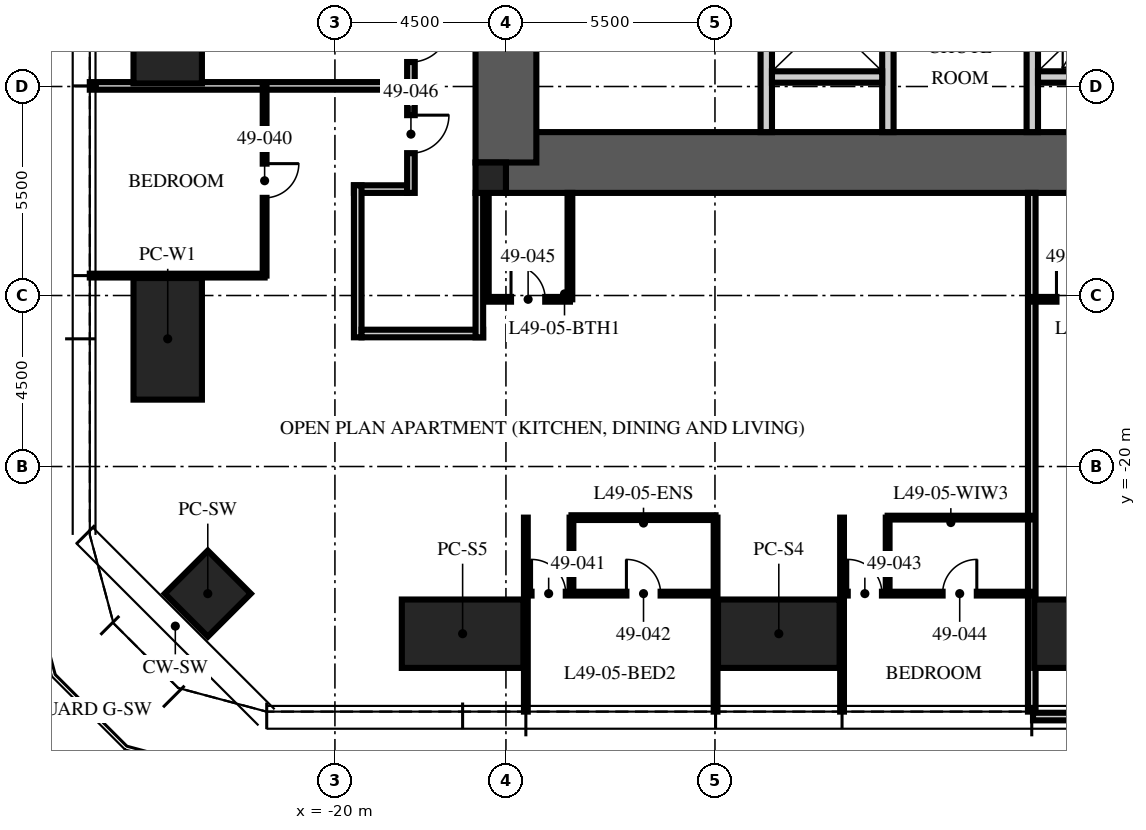
"""IFC4 building model, lengths in metres.
Left out: names, types, materials, properties, quantities, classifications, styles, units other than length and angle.
Written with IfcOpenShell. Run it as: python <this file> out.ifc"""

import sys

from ifc_helpers import new_model, si_unit, direction, frame, frame_2d, origin, origin_2d, place, context, subcontext, project, spatial, rectangle, hollow_rectangle, extrude, element, fill, save


model = new_model("IFC4")
c1 = context("Model", 3, precision=1e-05, world=origin(), true_north=direction((0.0, 1.0)))
c2 = subcontext(c1, "Body", "Model", "MODEL_VIEW")
j1 = project(units=[si_unit("LENGTHUNIT", "METRE"), si_unit("PLANEANGLEUNIT", "RADIAN")], contexts=[c1])
p1 = place(None, origin())
s1 = spatial("IfcSite", under=j1, at=p1, CompositionType="ELEMENT")
p2 = place(p1, origin())
s2 = spatial("IfcBuilding", under=s1, at=p2, CompositionType="ELEMENT")
p3 = place(p2, frame((0.0, 0.0, 199.5)))
s3 = spatial("IfcBuildingStorey", under=s2, at=p3, CompositionType="ELEMENT", Elevation=199.5)
p4 = place(p3, frame((-15.5, -12.0, -0.25), z_axis=(0.0, 0.0, 1.0), x_axis=(1.0, 0.0, 0.0)))
e1 = element("IfcWall", 1, at=p4, inside=s3, PredefinedType="SHEAR", context=c2, shape_type="SweptSolid", body=[
    extrude(rectangle(XDim=31.0, YDim=1.6, at=frame_2d((15.5, 0.0))), origin(), (0.0, 0.0, 1.0), 3.75),
])
p5 = place(p3, frame((-15.5, -12.0, -0.25), z_axis=(0.0, 0.0, 1.0), x_axis=(0.0, 1.0, 0.0)))
e2 = element("IfcWall", 2, at=p5, inside=s3, PredefinedType="SHEAR", context=c2, shape_type="SweptSolid", body=[
    extrude(rectangle(XDim=24.0, YDim=1.6, at=frame_2d((12.0, 0.0))), origin(), (0.0, 0.0, 1.0), 3.75),
])
p6 = place(p5, frame((3.2, 0.0, 0.25)))
e3 = element("IfcOpeningElement", 3, at=p6, cuts=e2, PredefinedType="OPENING", context=c2, shape_type="SweptSolid", body=[
    extrude(rectangle(XDim=1.2, YDim=2.1, at=frame_2d((0.6, 1.05))), frame((0.0, 0.81, 0.0), z_axis=(0.0, -1.0, 0.0), x_axis=(1.0, 0.0, 0.0)), (0.0, 0.0, 1.0), 1.62),
])
p7 = place(p5, frame((19.3, 0.0, 0.25)))
e4 = element("IfcOpeningElement", 4, at=p7, cuts=e2, PredefinedType="OPENING", context=c2, shape_type="SweptSolid", body=[
    extrude(rectangle(XDim=1.8, YDim=2.1, at=frame_2d((0.9, 1.05))), frame((0.0, 0.81, 0.0), z_axis=(0.0, -1.0, 0.0), x_axis=(1.0, 0.0, 0.0)), (0.0, 0.0, 1.0), 1.62),
])
p8 = place(p3, frame((-15.9, -12.4, -0.25), z_axis=(0.0, 0.0, 1.0), x_axis=(1.0, 0.0, 0.0)))
e5 = element("IfcColumn", 5, at=p8, inside=s3, PredefinedType="COLUMN", context=c2, shape_type="SweptSolid", body=[
    extrude(rectangle(XDim=0.8, YDim=0.8, at=origin_2d()), origin(), (0.0, 0.0, 1.0), 3.75),
])
p9 = place(p3, frame((0.0, -24.4, -0.23), z_axis=(0.0, 0.0, 1.0), x_axis=(1.0, 0.0, 0.0)))
e6 = element("IfcColumn", 6, at=p9, inside=s3, PredefinedType="COLUMN", context=c2, shape_type="SweptSolid", body=[
    extrude(hollow_rectangle(XDim=3.2, YDim=1.8, WallThickness=0.2, at=origin_2d()), origin(), (0.0, 0.0, 1.0), 3.98),
])
p10 = place(p3, frame((-8.32, -24.4, -0.07), z_axis=(0.0, 0.0, 1.0), x_axis=(1.0, 0.0, 0.0)))
e7 = element("IfcColumn", 7, at=p10, inside=s3, PredefinedType="COLUMN", context=c2, shape_type="SweptSolid", body=[
    extrude(hollow_rectangle(XDim=3.2, YDim=1.8, WallThickness=0.2, at=origin_2d()), origin(), (0.0, 0.0, 1.0), 3.82),
])
for number, where, z_axis, x_axis in (
    (8, (-16.64, -24.4, 0.08), (0.0, 0.0, 1.0), (1.0, 0.0, 0.0)),
    (9, (-24.4, -16.64, 0.08), (0.0, 0.0, 1.0), (0.0, 1.0, 0.0)),
):
    element("IfcColumn", number, at=place(p3, frame(where, z_axis=z_axis, x_axis=x_axis)), inside=s3, PredefinedType="COLUMN", context=c2, shape_type="SweptSolid", body=[
        extrude(hollow_rectangle(XDim=3.2, YDim=1.8, WallThickness=0.2, at=origin_2d()), origin(), (0.0, 0.0, 1.0), 3.67),
    ])
p11 = place(p3, frame((-24.4, -8.32, -0.07), z_axis=(0.0, 0.0, 1.0), x_axis=(0.0, 1.0, 0.0)))
e10 = element("IfcColumn", 10, at=p11, inside=s3, PredefinedType="COLUMN", context=c2, shape_type="SweptSolid", body=[
    extrude(hollow_rectangle(XDim=3.2, YDim=1.8, WallThickness=0.2, at=origin_2d()), origin(), (0.0, 0.0, 1.0), 3.82),
])
p12 = place(p3, frame((-23.346, -23.346, -0.19), z_axis=(0.0, 0.0, 1.0), x_axis=(0.707106781187, -0.707106781187, 0.0)))
e11 = element("IfcColumn", 11, at=p12, inside=s3, PredefinedType="COLUMN", context=c2, shape_type="SweptSolid", body=[
    extrude(hollow_rectangle(XDim=1.6, YDim=1.6, WallThickness=0.1, at=origin_2d()), origin(), (0.0, 0.0, 1.0), 3.94),
])
p13 = place(p3, frame((-1.632, -26.58, 0.0), z_axis=(0.0, 0.0, 1.0), x_axis=(1.0, 0.0, 0.0)))
e12 = element("IfcWall", 12, at=p13, inside=s3, PredefinedType="ELEMENTEDWALL", context=c2, shape_type="SweptSolid", body=[
    extrude(rectangle(XDim=3.263, YDim=0.2, at=frame_2d((1.632, 0.0))), origin(), (0.0, 0.0, 1.0), 3.75),
])
p14 = place(p13, frame((1.132, 0.0, 0.0)))
e13 = element("IfcOpeningElement", 13, at=p14, cuts=e12, PredefinedType="OPENING", context=c2, shape_type="SweptSolid", body=[
    extrude(rectangle(XDim=1.0, YDim=2.4, at=frame_2d((0.5, 1.2))), frame((0.0, 0.11, 0.0), z_axis=(0.0, -1.0, 0.0), x_axis=(1.0, 0.0, 0.0)), (0.0, 0.0, 1.0), 0.22),
])
p15 = place(p3, frame((-8.65, -11.2, 0.0), z_axis=(0.0, 0.0, 1.0), x_axis=(0.0, 1.0, 0.0)))
e14 = element("IfcWall", 14, at=p15, inside=s3, PredefinedType="PARTITIONING", context=c2, shape_type="SweptSolid", body=[
    extrude(rectangle(XDim=6.3, YDim=0.3, at=frame_2d((3.15, 0.0))), origin(), (0.0, 0.0, 1.0), 3.5),
])
p16 = place(p15, frame((2.45, 0.0, 0.0)))
e15 = element("IfcOpeningElement", 15, at=p16, cuts=e14, PredefinedType="OPENING", context=c2, shape_type="SweptSolid", body=[
    extrude(rectangle(XDim=1.1, YDim=2.1, at=frame_2d((0.55, 1.05))), frame((0.0, 0.16, 0.0), z_axis=(0.0, -1.0, 0.0), x_axis=(1.0, 0.0, 0.0)), (0.0, 0.0, 1.0), 0.32),
])
for number, where, z_axis, x_axis in (
    (16, (-5.45, -11.2, 0.0), (0.0, 0.0, 1.0), (0.0, 1.0, 0.0)),
    (17, (-1.65, -11.2, 0.0), (0.0, 0.0, 1.0), (0.0, 1.0, 0.0)),
):
    element("IfcWall", number, at=place(p3, frame(where, z_axis=z_axis, x_axis=x_axis)), inside=s3, PredefinedType="PARTITIONING", context=c2, shape_type="SweptSolid", body=[
        extrude(rectangle(XDim=4.4, YDim=0.3, at=frame_2d((2.2, 0.0))), origin(), (0.0, 0.0, 1.0), 3.5),
    ])
for number, where, z_axis, x_axis in (
    (18, (-8.5, -9.75, 0.0), (0.0, 0.0, 1.0), (1.0, 0.0, 0.0)),
    (19, (-1.5, -9.75, 0.0), (0.0, 0.0, 1.0), (1.0, 0.0, 0.0)),
):
    element("IfcWall", number, at=place(p3, frame(where, z_axis=z_axis, x_axis=x_axis)), inside=s3, PredefinedType="PARTITIONING", context=c2, shape_type="SweptSolid", body=[
        extrude(rectangle(XDim=2.9, YDim=0.3, at=frame_2d((1.45, 0.0))), origin(), (0.0, 0.0, 1.0), 3.5),
    ])
p17 = place(p3, frame((-18.1, -12.7, 0.0), z_axis=(0.0, 0.0, 1.0), x_axis=(-1.0, 0.0, 0.0)))
e20 = element("IfcWall", 20, at=p17, inside=s3, PredefinedType="PARTITIONING", context=c2, shape_type="SweptSolid", body=[
    extrude(rectangle(XDim=1.4, YDim=0.2, at=frame_2d((0.7, 0.0))), origin(), (0.0, 0.0, 1.0), 2.81),
])
p18 = place(p3, frame((-19.4, -12.6, 0.0), z_axis=(0.0, 0.0, 1.0), x_axis=(0.0, -1.0, 0.0)))
e21 = element("IfcWall", 21, at=p18, inside=s3, PredefinedType="PARTITIONING", context=c2, shape_type="SweptSolid", body=[
    extrude(rectangle(XDim=4.0, YDim=0.2, at=frame_2d((2.0, 0.0))), origin(), (0.0, 0.0, 1.0), 2.6),
])
p19 = place(p3, frame((-19.3, -16.5, 0.0), z_axis=(0.0, 0.0, 1.0), x_axis=(1.0, 0.0, 0.0)))
e22 = element("IfcWall", 22, at=p19, inside=s3, PredefinedType="PARTITIONING", context=c2, shape_type="SweptSolid", body=[
    extrude(rectangle(XDim=3.2, YDim=0.2, at=frame_2d((1.6, 0.0))), origin(), (0.0, 0.0, 1.0), 2.3),
])
p20 = place(p3, frame((-16.2, -16.6, 0.0), z_axis=(0.0, 0.0, 1.0), x_axis=(0.0, 1.0, 0.0)))
e23 = element("IfcWall", 23, at=p20, inside=s3, PredefinedType="PARTITIONING", context=c2, shape_type="SweptSolid", body=[
    extrude(rectangle(XDim=3.8, YDim=0.2, at=frame_2d((1.9, 0.0))), origin(), (0.0, 0.0, 1.0), 2.3),
])
p21 = place(p3, frame((-18.1, -9.984, 0.0), z_axis=(0.0, 0.0, 1.0), x_axis=(-1.0, 0.0, 0.0)))
e24 = element("IfcWall", 24, at=p21, inside=s3, PredefinedType="PARTITIONING", context=c2, shape_type="SweptSolid", body=[
    extrude(rectangle(XDim=8.35, YDim=0.2, at=frame_2d((4.175, 0.0))), origin(), (0.0, 0.0, 1.0), 2.91),
])
p22 = place(p3, frame((-21.85, -14.976, 0.0), z_axis=(0.0, 0.0, 1.0), x_axis=(-1.0, 0.0, 0.0)))
e25 = element("IfcWall", 25, at=p22, inside=s3, PredefinedType="PARTITIONING", context=c2, shape_type="SweptSolid", body=[
    extrude(rectangle(XDim=4.6, YDim=0.1, at=frame_2d((2.3, 0.0))), origin(), (0.0, 0.0, 1.0), 2.91),
])
for number, where, z_axis, x_axis in (
    (26, (-14.976, -21.345, 0.0), (0.0, 0.0, 1.0), (0.0, -1.0, 0.0)),
    (27, (-9.984, -21.345, 0.0), (0.0, 0.0, 1.0), (0.0, -1.0, 0.0)),
    (28, (-6.656, -21.345, 0.0), (0.0, 0.0, 1.0), (0.0, -1.0, 0.0)),
):
    element("IfcWall", number, at=place(p3, frame(where, z_axis=z_axis, x_axis=x_axis)), inside=s3, PredefinedType="PARTITIONING", context=c2, shape_type="SweptSolid", body=[
        extrude(rectangle(XDim=5.105, YDim=0.1, at=frame_2d((2.552, 0.0))), origin(), (0.0, 0.0, 1.0), 2.91),
    ])
p23 = place(p3, frame((-1.664, -12.8, 0.0), z_axis=(0.0, 0.0, 1.0), x_axis=(0.0, -1.0, 0.0)))
e29 = element("IfcWall", 29, at=p23, inside=s3, PredefinedType="PARTITIONING", context=c2, shape_type="SweptSolid", body=[
    extrude(rectangle(XDim=13.65, YDim=0.2, at=frame_2d((6.825, 0.0))), origin(), (0.0, 0.0, 1.0), 2.91),
])
p24 = place(p3, frame((-21.85, -9.984, 0.0), z_axis=(0.0, 0.0, 1.0), x_axis=(0.0, -1.0, 0.0)))
e30 = element("IfcWall", 30, at=p24, inside=s3, PredefinedType="PARTITIONING", context=c2, shape_type="SweptSolid", body=[
    extrude(rectangle(XDim=4.992, YDim=0.1, at=frame_2d((2.496, 0.0))), origin(), (0.0, 0.0, 1.0), 2.81),
])
p25 = place(p24, frame((2.046, 0.0, 0.0)))
e31 = element("IfcOpeningElement", 31, at=p25, cuts=e30, PredefinedType="OPENING", context=c2, shape_type="SweptSolid", body=[
    extrude(rectangle(XDim=0.9, YDim=2.1, at=frame_2d((0.45, 1.05))), frame((0.0, 0.06, 0.0), z_axis=(0.0, -1.0, 0.0), x_axis=(1.0, 0.0, 0.0)), (0.0, 0.0, 1.0), 0.12),
])
p26 = place(p3, frame((-14.976, -23.345, 0.0), z_axis=(0.0, 0.0, 1.0), x_axis=(1.0, 0.0, 0.0)))
e32 = element("IfcWall", 32, at=p26, inside=s3, PredefinedType="PARTITIONING", context=c2, shape_type="SweptSolid", body=[
    extrude(rectangle(XDim=4.992, YDim=0.1, at=frame_2d((2.496, 0.0))), origin(), (0.0, 0.0, 1.0), 2.81),
])
p27 = place(p26, frame((0.15, 0.0, 0.0)))
e33 = element("IfcOpeningElement", 33, at=p27, cuts=e32, PredefinedType="OPENING", context=c2, shape_type="SweptSolid", body=[
    extrude(rectangle(XDim=0.9, YDim=2.1, at=frame_2d((0.45, 1.05))), frame((0.0, 0.06, 0.0), z_axis=(0.0, -1.0, 0.0), x_axis=(1.0, 0.0, 0.0)), (0.0, 0.0, 1.0), 0.12),
])
p28 = place(p26, frame((2.646, 0.0, 0.0)))
e34 = element("IfcOpeningElement", 34, at=p28, cuts=e32, PredefinedType="OPENING", context=c2, shape_type="SweptSolid", body=[
    extrude(rectangle(XDim=0.9, YDim=2.1, at=frame_2d((0.45, 1.05))), frame((0.0, 0.06, 0.0), z_axis=(0.0, -1.0, 0.0), x_axis=(1.0, 0.0, 0.0)), (0.0, 0.0, 1.0), 0.12),
])
p29 = place(p3, frame((-13.776, -21.345, 0.0), z_axis=(0.0, 0.0, 1.0), x_axis=(0.0, -1.0, 0.0)))
e35 = element("IfcWall", 35, at=p29, inside=s3, PredefinedType="PARTITIONING", context=c2, shape_type="SweptSolid", body=[
    extrude(rectangle(XDim=2.0, YDim=0.1, at=frame_2d((1.0, 0.0))), origin(), (0.0, 0.0, 1.0), 3.5),
])
p30 = place(p3, frame((-13.776, -21.345, 0.0), z_axis=(0.0, 0.0, 1.0), x_axis=(1.0, 0.0, 0.0)))
e36 = element("IfcWall", 36, at=p30, inside=s3, PredefinedType="PARTITIONING", context=c2, shape_type="SweptSolid", body=[
    extrude(rectangle(XDim=3.792, YDim=0.125, at=frame_2d((1.896, 0.0))), origin(), (0.0, 0.0, 1.0), 2.81),
])
p31 = place(p3, frame((-6.656, -23.345, 0.0), z_axis=(0.0, 0.0, 1.0), x_axis=(1.0, 0.0, 0.0)))
e37 = element("IfcWall", 37, at=p31, inside=s3, PredefinedType="PARTITIONING", context=c2, shape_type="SweptSolid", body=[
    extrude(rectangle(XDim=4.992, YDim=0.1, at=frame_2d((2.496, 0.0))), origin(), (0.0, 0.0, 1.0), 2.81),
])
p32 = place(p31, frame((0.15, 0.0, 0.0)))
e38 = element("IfcOpeningElement", 38, at=p32, cuts=e37, PredefinedType="OPENING", context=c2, shape_type="SweptSolid", body=[
    extrude(rectangle(XDim=0.9, YDim=2.1, at=frame_2d((0.45, 1.05))), frame((0.0, 0.06, 0.0), z_axis=(0.0, -1.0, 0.0), x_axis=(1.0, 0.0, 0.0)), (0.0, 0.0, 1.0), 0.12),
])
p33 = place(p31, frame((2.646, 0.0, 0.0)))
e39 = element("IfcOpeningElement", 39, at=p33, cuts=e37, PredefinedType="OPENING", context=c2, shape_type="SweptSolid", body=[
    extrude(rectangle(XDim=0.9, YDim=2.1, at=frame_2d((0.45, 1.05))), frame((0.0, 0.06, 0.0), z_axis=(0.0, -1.0, 0.0), x_axis=(1.0, 0.0, 0.0)), (0.0, 0.0, 1.0), 0.12),
])
p34 = place(p3, frame((-5.456, -21.345, 0.0), z_axis=(0.0, 0.0, 1.0), x_axis=(0.0, -1.0, 0.0)))
e40 = element("IfcWall", 40, at=p34, inside=s3, PredefinedType="PARTITIONING", context=c2, shape_type="SweptSolid", body=[
    extrude(rectangle(XDim=2.0, YDim=0.1, at=frame_2d((1.0, 0.0))), origin(), (0.0, 0.0, 1.0), 3.5),
])
p35 = place(p3, frame((-5.456, -21.345, 0.0), z_axis=(0.0, 0.0, 1.0), x_axis=(1.0, 0.0, 0.0)))
e41 = element("IfcWall", 41, at=p35, inside=s3, PredefinedType="PARTITIONING", context=c2, shape_type="SweptSolid", body=[
    extrude(rectangle(XDim=3.792, YDim=0.1, at=frame_2d((1.896, 0.0))), origin(), (0.0, 0.0, 1.0), 2.81),
])
p36 = place(p3, frame((-16.017, -15.6, 0.0), z_axis=(0.0, 0.0, 1.0), x_axis=(1.0, 0.0, 0.0)))
e42 = element("IfcWall", 42, at=p36, inside=s3, PredefinedType="PARTITIONING", context=c2, shape_type="SweptSolid", body=[
    extrude(rectangle(XDim=2.2, YDim=0.125, at=frame_2d((1.1, 0.0))), origin(), (0.0, 0.0, 1.0), 3.5),
])
p37 = place(p36, frame((0.65, 0.0, 0.0)))
e43 = element("IfcOpeningElement", 43, at=p37, cuts=e42, PredefinedType="OPENING", context=c2, shape_type="SweptSolid", body=[
    extrude(rectangle(XDim=0.9, YDim=2.1, at=frame_2d((0.45, 1.05))), frame((0.0, 0.073, 0.0), z_axis=(0.0, -1.0, 0.0), x_axis=(1.0, 0.0, 0.0)), (0.0, 0.0, 1.0), 0.145),
])
p38 = place(p3, frame((-16.017, -12.8, 0.0), z_axis=(0.0, 0.0, 1.0), x_axis=(0.0, -1.0, 0.0)))
e44 = element("IfcWall", 44, at=p38, inside=s3, PredefinedType="PARTITIONING", context=c2, shape_type="SweptSolid", body=[
    extrude(rectangle(XDim=2.8, YDim=0.125, at=frame_2d((1.4, 0.0))), origin(), (0.0, 0.0, 1.0), 2.3),
])
p39 = place(p3, frame((-13.816, -12.8, 0.0), z_axis=(0.0, 0.0, 1.0), x_axis=(0.0, -1.0, 0.0)))
e45 = element("IfcWall", 45, at=p39, inside=s3, PredefinedType="PARTITIONING", context=c2, shape_type="SweptSolid", body=[
    extrude(rectangle(XDim=2.8, YDim=0.125, at=frame_2d((1.4, 0.0))), origin(), (0.0, 0.0, 1.0), 3.5),
])
p40 = place(p3, frame((-1.664, -15.6, 0.0), z_axis=(0.0, 0.0, 1.0), x_axis=(1.0, 0.0, 0.0)))
e46 = element("IfcWall", 46, at=p40, inside=s3, PredefinedType="PARTITIONING", context=c2, shape_type="SweptSolid", body=[
    extrude(rectangle(XDim=2.2, YDim=0.125, at=frame_2d((1.1, 0.0))), origin(), (0.0, 0.0, 1.0), 2.6),
])
p41 = place(p40, frame((0.65, 0.0, 0.0)))
e47 = element("IfcOpeningElement", 47, at=p41, cuts=e46, PredefinedType="OPENING", context=c2, shape_type="SweptSolid", body=[
    extrude(rectangle(XDim=0.9, YDim=2.1, at=frame_2d((0.45, 1.05))), frame((0.0, 0.073, 0.0), z_axis=(0.0, -1.0, 0.0), x_axis=(1.0, 0.0, 0.0)), (0.0, 0.0, 1.0), 0.145),
])
p42 = place(p3, frame((-18.0, 13.0, 0.0), z_axis=(0.0, 0.0, 1.0), x_axis=(0.0, -1.0, 0.0)))
e48 = element("IfcWall", 48, at=p42, inside=s3, PredefinedType="PARTITIONING", context=c2, shape_type="SweptSolid", body=[
    extrude(rectangle(XDim=25.8, YDim=0.2, at=frame_2d((12.9, 0.0))), origin(), (0.0, 0.0, 1.0), 2.6),
])
p43 = place(p42, frame((9.6, 0.0, 0.0)))
e49 = element("IfcOpeningElement", 49, at=p43, cuts=e48, PredefinedType="OPENING", context=c2, shape_type="SweptSolid", body=[
    extrude(rectangle(XDim=1.0, YDim=2.2, at=frame_2d((0.5, 1.1))), frame((0.0, 0.11, 0.0), z_axis=(0.0, -1.0, 0.0), x_axis=(1.0, 0.0, 0.0)), (0.0, 0.0, 1.0), 0.22),
])
p44 = place(p42, frame((21.356, 0.0, 0.0)))
e50 = element("IfcOpeningElement", 50, at=p44, cuts=e48, PredefinedType="OPENING", context=c2, shape_type="SweptSolid", body=[
    extrude(rectangle(XDim=1.0, YDim=2.2, at=frame_2d((0.5, 1.1))), frame((0.0, 0.11, 0.0), z_axis=(0.0, -1.0, 0.0), x_axis=(1.0, 0.0, 0.0)), (0.0, 0.0, 1.0), 0.22),
])
p45 = place(p42, frame((23.754, 0.0, 0.0)))
e51 = element("IfcOpeningElement", 51, at=p45, cuts=e48, PredefinedType="OPENING", context=c2, shape_type="SweptSolid", body=[
    extrude(rectangle(XDim=1.0, YDim=2.2, at=frame_2d((0.5, 1.1))), frame((0.0, 0.11, 0.0), z_axis=(0.0, -1.0, 0.0), x_axis=(1.0, 0.0, 0.0)), (0.0, 0.0, 1.0), 0.22),
])
p46 = place(p44, origin())
e52 = element("IfcDoor", 52, at=p46, inside=s3, OperationType="SINGLE_SWING_LEFT", PredefinedType="DOOR", context=c2, shape_type="SweptSolid", body=[
    extrude(rectangle(XDim=1.0, YDim=2.2, at=frame_2d((0.5, 1.1))), frame((0.0, 0.025, 0.0), z_axis=(0.0, -1.0, 0.0), x_axis=(1.0, 0.0, 0.0)), (0.0, 0.0, 1.0), 0.05),
])
fill(e50, e52)
p47 = place(p25, origin())
e53 = element("IfcDoor", 53, at=p47, inside=s3, OperationType="SINGLE_SWING_LEFT", PredefinedType="DOOR", context=c2, shape_type="SweptSolid", body=[
    extrude(rectangle(XDim=0.9, YDim=2.1, at=frame_2d((0.45, 1.05))), frame((0.0, 0.025, 0.0), z_axis=(0.0, -1.0, 0.0), x_axis=(1.0, 0.0, 0.0)), (0.0, 0.0, 1.0), 0.05),
])
fill(e31, e53)
p48 = place(p27, origin())
e54 = element("IfcDoor", 54, at=p48, inside=s3, OperationType="SINGLE_SWING_LEFT", PredefinedType="DOOR", context=c2, shape_type="SweptSolid", body=[
    extrude(rectangle(XDim=0.9, YDim=2.1, at=frame_2d((0.45, 1.05))), frame((0.0, 0.025, 0.0), z_axis=(0.0, -1.0, 0.0), x_axis=(1.0, 0.0, 0.0)), (0.0, 0.0, 1.0), 0.05),
])
fill(e33, e54)
p49 = place(p28, origin())
e55 = element("IfcDoor", 55, at=p49, inside=s3, OperationType="SINGLE_SWING_LEFT", PredefinedType="DOOR", context=c2, shape_type="SweptSolid", body=[
    extrude(rectangle(XDim=0.9, YDim=2.1, at=frame_2d((0.45, 1.05))), frame((0.0, 0.025, 0.0), z_axis=(0.0, -1.0, 0.0), x_axis=(1.0, 0.0, 0.0)), (0.0, 0.0, 1.0), 0.05),
])
fill(e34, e55)
p50 = place(p32, origin())
e56 = element("IfcDoor", 56, at=p50, inside=s3, OperationType="SINGLE_SWING_LEFT", PredefinedType="DOOR", context=c2, shape_type="SweptSolid", body=[
    extrude(rectangle(XDim=0.9, YDim=2.1, at=frame_2d((0.45, 1.05))), frame((0.0, 0.025, 0.0), z_axis=(0.0, -1.0, 0.0), x_axis=(1.0, 0.0, 0.0)), (0.0, 0.0, 1.0), 0.05),
])
fill(e38, e56)
p51 = place(p33, origin())
e57 = element("IfcDoor", 57, at=p51, inside=s3, OperationType="SINGLE_SWING_RIGHT", PredefinedType="DOOR", context=c2, shape_type="SweptSolid", body=[
    extrude(rectangle(XDim=0.9, YDim=2.1, at=frame_2d((0.45, 1.05))), frame((0.0, 0.025, 0.0), z_axis=(0.0, -1.0, 0.0), x_axis=(1.0, 0.0, 0.0)), (0.0, 0.0, 1.0), 0.05),
])
fill(e39, e57)
p52 = place(p37, origin())
e58 = element("IfcDoor", 58, at=p52, inside=s3, OperationType="SINGLE_SWING_LEFT", PredefinedType="DOOR", context=c2, shape_type="SweptSolid", body=[
    extrude(rectangle(XDim=0.9, YDim=2.1, at=frame_2d((0.45, 1.05))), frame((0.0, 0.025, 0.0), z_axis=(0.0, -1.0, 0.0), x_axis=(1.0, 0.0, 0.0)), (0.0, 0.0, 1.0), 0.05),
])
fill(e43, e58)
p53 = place(p45, origin())
e59 = element("IfcDoor", 59, at=p53, inside=s3, OperationType="SINGLE_SWING_LEFT", PredefinedType="DOOR", context=c2, shape_type="SweptSolid", body=[
    extrude(rectangle(XDim=1.0, YDim=2.2, at=frame_2d((0.5, 1.1))), frame((0.0, 0.025, 0.0), z_axis=(0.0, -1.0, 0.0), x_axis=(1.0, 0.0, 0.0)), (0.0, 0.0, 1.0), 0.05),
])
fill(e51, e59)
p54 = place(p41, origin())
e60 = element("IfcDoor", 60, at=p54, inside=s3, OperationType="SINGLE_SWING_LEFT", PredefinedType="DOOR", context=c2, shape_type="SweptSolid", body=[
    extrude(rectangle(XDim=0.9, YDim=2.1, at=frame_2d((0.45, 1.05))), frame((0.0, 0.025, 0.0), z_axis=(0.0, -1.0, 0.0), x_axis=(1.0, 0.0, 0.0)), (0.0, 0.0, 1.0), 0.05),
])
fill(e47, e60)
save(model, sys.argv[1])
